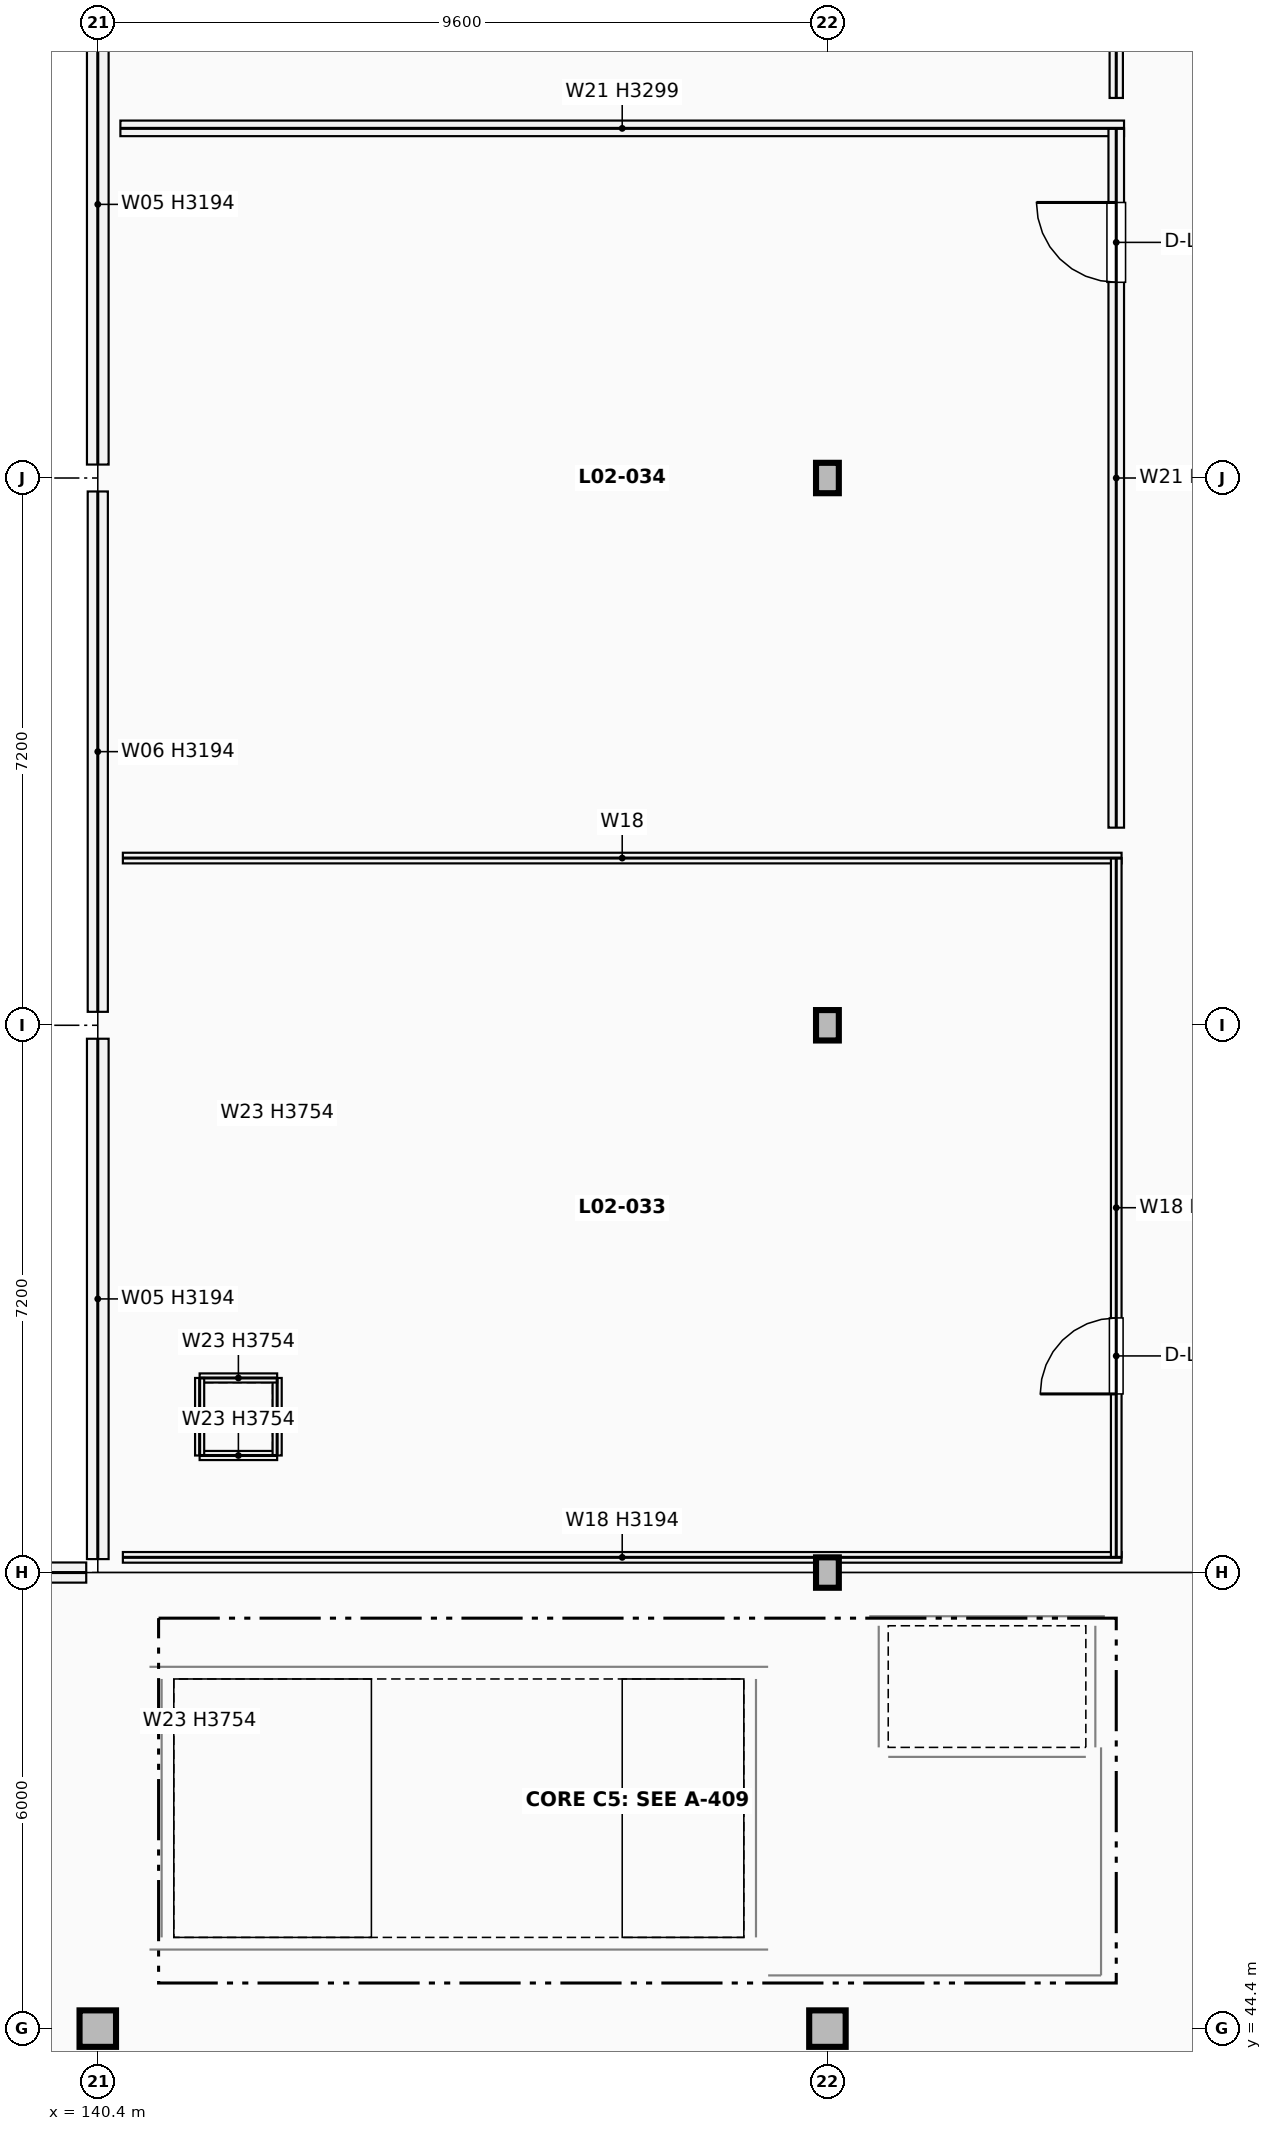
"""IFC4 building model, lengths in metres.
Left out: names, types, materials, properties, quantities, classifications, styles, units other than length and angle.
Written with IfcOpenShell. Run it as: python <this file> out.ifc"""

import sys

from ifc_helpers import new_model, si_unit, direction, frame, frame_2d, origin, origin_2d, place, context, subcontext, project, spatial, rectangle, i_section, extrude, element, fill, save


model = new_model("IFC4")
c1 = context("Model", 3, precision=1e-05, world=origin(), true_north=direction((0.0, 1.0)))
c2 = subcontext(c1, "Body", "Model", "MODEL_VIEW")
j1 = project(units=[si_unit("LENGTHUNIT", "METRE"), si_unit("PLANEANGLEUNIT", "RADIAN")], contexts=[c1])
p1 = place(None, origin())
s1 = spatial("IfcSite", under=j1, at=p1, CompositionType="ELEMENT")
p2 = place(p1, origin())
s2 = spatial("IfcBuilding", under=s1, at=p2, CompositionType="ELEMENT")
p3 = place(p2, frame((0.0, 0.0, 9.52)))
s3 = spatial("IfcBuildingStorey", under=s2, at=p3, CompositionType="ELEMENT", Elevation=9.52)
for number, where, z_axis, x_axis in (
    (1, (140.4, 44.4, 0.0), (0.0, 0.0, 1.0), (1.0, 0.0, 0.0)),
    (2, (150.0, 44.4, 0.0), (0.0, 0.0, 1.0), (1.0, 0.0, 0.0)),
):
    element("IfcColumn", number, at=place(p3, frame(where, z_axis=z_axis, x_axis=x_axis)), inside=s3, PredefinedType="COLUMN", context=c2, shape_type="SweptSolid", body=[
        extrude(rectangle(XDim=0.48, YDim=0.48, at=origin_2d()), origin(), (0.0, 0.0, 1.0), 4.08),
    ])
for number, where, z_axis, x_axis in (
    (3, (150.0, 50.4, 0.0), (0.0, 0.0, 1.0), (1.0, 0.0, 0.0)),
    (4, (150.0, 57.6, 0.0), (0.0, 0.0, 1.0), (1.0, 0.0, 0.0)),
    (5, (150.0, 64.8, 0.0), (0.0, 0.0, 1.0), (1.0, 0.0, 0.0)),
):
    element("IfcColumn", number, at=place(p3, frame(where, z_axis=z_axis, x_axis=x_axis)), inside=s3, PredefinedType="COLUMN", context=c2, shape_type="SweptSolid", body=[
        extrude(i_section(OverallWidth=0.3, OverallDepth=0.4, WebThickness=0.013, FlangeThickness=0.024, at=origin_2d()), origin(), (0.0, 0.0, 1.0), 4.08),
    ])
p4 = place(p3, frame((131.042, 50.4, 0.0), z_axis=(0.0, 0.0, 1.0), x_axis=(1.0, 0.0, 0.0)))
e6 = element("IfcWall", 6, at=p4, inside=s3, PredefinedType="SOLIDWALL", context=c2, shape_type="SweptSolid", body=[
    extrude(rectangle(XDim=9.206, YDim=0.265, at=frame_2d((4.603, 0.0))), origin(), (0.0, 0.0, 1.0), 3.194),
])
p5 = place(p4, frame((1.734, 0.0, 0.75)))
e7 = element("IfcOpeningElement", 7, at=p5, cuts=e6, PredefinedType="OPENING", context=c2, shape_type="SweptSolid", body=[
    extrude(rectangle(XDim=1.05, YDim=2.3, at=frame_2d((0.525, 1.15))), frame((0.0, 0.143, 0.0), z_axis=(0.0, -1.0, 0.0), x_axis=(1.0, 0.0, 0.0)), (0.0, 0.0, 1.0), 0.285),
])
p6 = place(p4, frame((4.078, 0.0, 0.75)))
e8 = element("IfcOpeningElement", 8, at=p6, cuts=e6, PredefinedType="OPENING", context=c2, shape_type="SweptSolid", body=[
    extrude(rectangle(XDim=1.05, YDim=2.3, at=frame_2d((0.525, 1.15))), frame((0.0, 0.143, 0.0), z_axis=(0.0, -1.0, 0.0), x_axis=(1.0, 0.0, 0.0)), (0.0, 0.0, 1.0), 0.285),
])
p7 = place(p4, frame((6.422, 0.0, 0.75)))
e9 = element("IfcOpeningElement", 9, at=p7, cuts=e6, PredefinedType="OPENING", context=c2, shape_type="SweptSolid", body=[
    extrude(rectangle(XDim=1.05, YDim=2.3, at=frame_2d((0.525, 1.15))), frame((0.0, 0.143, 0.0), z_axis=(0.0, -1.0, 0.0), x_axis=(1.0, 0.0, 0.0)), (0.0, 0.0, 1.0), 0.285),
])
p8 = place(p3, frame((140.4, 50.577, 0.0), z_axis=(0.0, 0.0, 1.0), x_axis=(0.0, 1.0, 0.0)))
e10 = element("IfcWall", 10, at=p8, inside=s3, PredefinedType="SOLIDWALL", context=c2, shape_type="SweptSolid", body=[
    extrude(rectangle(XDim=6.846, YDim=0.285, at=frame_2d((3.423, 0.0))), origin(), (0.0, 0.0, 1.0), 3.194),
])
p9 = place(p3, frame((140.4, 57.777, 0.0), z_axis=(0.0, 0.0, 1.0), x_axis=(0.0, 1.0, 0.0)))
e11 = element("IfcWall", 11, at=p9, inside=s3, PredefinedType="SOLIDWALL", context=c2, shape_type="SweptSolid", body=[
    extrude(rectangle(XDim=6.846, YDim=0.265, at=frame_2d((3.423, 0.0))), origin(), (0.0, 0.0, 1.0), 3.194),
])
p10 = place(p3, frame((140.4, 64.977, 0.0), z_axis=(0.0, 0.0, 1.0), x_axis=(0.0, 1.0, 0.0)))
e12 = element("IfcWall", 12, at=p10, inside=s3, PredefinedType="SOLIDWALL", context=c2, shape_type="SweptSolid", body=[
    extrude(rectangle(XDim=6.846, YDim=0.285, at=frame_2d((3.423, 0.0))), origin(), (0.0, 0.0, 1.0), 3.194),
])
for number, where, z_axis, x_axis in (
    (13, (141.74, 51.94, 0.0), (0.0, 0.0, 1.0), (1.0, 0.0, 0.0)),
    (14, (142.76, 51.94, 0.0), (0.0, 0.0, 1.0), (0.0, 1.0, 0.0)),
    (15, (142.76, 52.96, 0.0), (0.0, 0.0, 1.0), (-1.0, 0.0, 0.0)),
    (16, (141.74, 52.96, 0.0), (0.0, 0.0, 1.0), (0.0, -1.0, 0.0)),
):
    element("IfcWall", number, at=place(p3, frame(where, z_axis=z_axis, x_axis=x_axis)), inside=s3, PredefinedType="PARTITIONING", context=c2, shape_type="SweptSolid", body=[
        extrude(rectangle(XDim=1.02, YDim=0.12, at=frame_2d((0.51, 0.0))), origin(), (0.0, 0.0, 1.0), 3.754),
    ])
p11 = place(p3, frame((141.24, 45.6, 0.0), z_axis=(0.0, 0.0, 1.0), x_axis=(0.0, 1.0, 0.0)))
e17 = element("IfcWall", 17, at=p11, inside=s3, PredefinedType="SHEAR", context=c2, shape_type="SweptSolid", body=[
    extrude(rectangle(XDim=3.4, YDim=0.32, at=frame_2d((1.7, 0.0))), origin(), (0.0, 0.0, 1.0), 4.08),
])
for number, where, z_axis, x_axis in (
    (18, (141.08, 45.44, 0.0), (0.0, 0.0, 1.0), (1.0, 0.0, 0.0)),
    (19, (141.08, 49.16, 0.0), (0.0, 0.0, 1.0), (1.0, 0.0, 0.0)),
):
    element("IfcWall", number, at=place(p3, frame(where, z_axis=z_axis, x_axis=x_axis)), inside=s3, PredefinedType="SHEAR", context=c2, shape_type="SweptSolid", body=[
        extrude(rectangle(XDim=8.14, YDim=0.32, at=frame_2d((4.07, 0.0))), origin(), (0.0, 0.0, 1.0), 4.08),
    ])
p12 = place(p3, frame((149.06, 45.6, 0.0), z_axis=(0.0, 0.0, 1.0), x_axis=(0.0, 1.0, 0.0)))
e20 = element("IfcWall", 20, at=p12, inside=s3, PredefinedType="SHEAR", context=c2, shape_type="SweptSolid", body=[
    extrude(rectangle(XDim=3.4, YDim=0.32, at=frame_2d((1.7, 0.0))), origin(), (0.0, 0.0, 1.0), 4.08),
])
p13 = place(p12, frame((0.65, 0.0, 0.0)))
e21 = element("IfcOpeningElement", 21, at=p13, cuts=e20, PredefinedType="OPENING", context=c2, shape_type="SweptSolid", body=[
    extrude(rectangle(XDim=1.2, YDim=2.2, at=frame_2d((0.6, 1.1))), frame((0.0, 0.17, 0.0), z_axis=(0.0, -1.0, 0.0), x_axis=(1.0, 0.0, 0.0)), (0.0, 0.0, 1.0), 0.34),
])
for number, where, z_axis, x_axis in (
    (22, (150.675, 48.1, 0.0), (0.0, 0.0, 1.0), (0.0, 1.0, 0.0)),
    (23, (153.525, 48.1, 0.0), (0.0, 0.0, 1.0), (0.0, 1.0, 0.0)),
):
    element("IfcWall", number, at=place(p3, frame(where, z_axis=z_axis, x_axis=x_axis)), inside=s3, PredefinedType="SHEAR", context=c2, shape_type="SweptSolid", body=[
        extrude(rectangle(XDim=1.6, YDim=0.25, at=frame_2d((0.8, 0.0))), origin(), (0.0, 0.0, 1.0), 4.08),
    ])
p14 = place(p3, frame((150.55, 49.825, 0.0), z_axis=(0.0, 0.0, 1.0), x_axis=(1.0, 0.0, 0.0)))
e24 = element("IfcWall", 24, at=p14, inside=s3, PredefinedType="SHEAR", context=c2, shape_type="SweptSolid", body=[
    extrude(rectangle(XDim=3.1, YDim=0.25, at=frame_2d((1.55, 0.0))), origin(), (0.0, 0.0, 1.0), 4.08),
])
p15 = place(p3, frame((150.8, 47.975, 0.0), z_axis=(0.0, 0.0, 1.0), x_axis=(1.0, 0.0, 0.0)))
e25 = element("IfcWall", 25, at=p15, inside=s3, PredefinedType="SHEAR", context=c2, shape_type="SweptSolid", body=[
    extrude(rectangle(XDim=2.6, YDim=0.25, at=frame_2d((1.3, 0.0))), origin(), (0.0, 0.0, 1.0), 4.08),
])
p16 = place(p15, frame((0.75, 0.0, 0.0)))
e26 = element("IfcOpeningElement", 26, at=p16, cuts=e25, PredefinedType="OPENING", context=c2, shape_type="SweptSolid", body=[
    extrude(rectangle(XDim=1.1, YDim=2.15, at=frame_2d((0.55, 1.075))), frame((0.0, 0.135, 0.0), z_axis=(0.0, -1.0, 0.0), x_axis=(1.0, 0.0, 0.0)), (0.0, 0.0, 1.0), 0.27),
])
p17 = place(p3, frame((153.6, 45.1, 0.0), z_axis=(0.0, 0.0, 1.0), x_axis=(0.0, 1.0, 0.0)))
e27 = element("IfcWall", 27, at=p17, inside=s3, PredefinedType="PARTITIONING", context=c2, shape_type="SweptSolid", body=[
    extrude(rectangle(XDim=3.0, YDim=0.2, at=frame_2d((1.5, 0.0))), origin(), (0.0, 0.0, 1.0), 3.299),
])
p18 = place(p17, frame((0.775, 0.0, 0.0)))
e28 = element("IfcOpeningElement", 28, at=p18, cuts=e27, PredefinedType="OPENING", context=c2, shape_type="SweptSolid", body=[
    extrude(rectangle(XDim=1.45, YDim=2.2, at=frame_2d((0.725, 1.1))), frame((0.0, 0.11, 0.0), z_axis=(0.0, -1.0, 0.0), x_axis=(1.0, 0.0, 0.0)), (0.0, 0.0, 1.0), 0.22),
])
p19 = place(p3, frame((149.22, 45.1, 0.0), z_axis=(0.0, 0.0, 1.0), x_axis=(1.0, 0.0, 0.0)))
e29 = element("IfcWall", 29, at=p19, inside=s3, PredefinedType="PARTITIONING", context=c2, shape_type="SweptSolid", body=[
    extrude(rectangle(XDim=4.38, YDim=0.2, at=frame_2d((2.19, 0.0))), origin(), (0.0, 0.0, 1.0), 3.299),
])
p20 = place(p3, frame((140.73, 50.6, 0.0), z_axis=(0.0, 0.0, 1.0), x_axis=(1.0, 0.0, 0.0)))
e30 = element("IfcWall", 30, at=p20, inside=s3, PredefinedType="PARTITIONING", context=c2, shape_type="SweptSolid", body=[
    extrude(rectangle(XDim=13.14, YDim=0.14, at=frame_2d((6.57, 0.0))), origin(), (0.0, 0.0, 1.0), 3.194),
])
p21 = place(p3, frame((140.73, 59.8, 0.0), z_axis=(0.0, 0.0, 1.0), x_axis=(1.0, 0.0, 0.0)))
e31 = element("IfcWall", 31, at=p21, inside=s3, PredefinedType="PARTITIONING", context=c2, shape_type="SweptSolid", body=[
    extrude(rectangle(XDim=13.14, YDim=0.14, at=frame_2d((6.57, 0.0))), origin(), (0.0, 0.0, 1.0), 3.299),
])
p22 = place(p3, frame((153.8, 50.6, 0.0), z_axis=(0.0, 0.0, 1.0), x_axis=(0.0, 1.0, 0.0)))
e32 = element("IfcWall", 32, at=p22, inside=s3, PredefinedType="PARTITIONING", context=c2, shape_type="SweptSolid", body=[
    extrude(rectangle(XDim=9.2, YDim=0.14, at=frame_2d((4.6, 0.0))), origin(), (0.0, 0.0, 1.0), 3.194),
])
p23 = place(p22, frame((2.15, 0.0, 0.0)))
e33 = element("IfcOpeningElement", 33, at=p23, cuts=e32, PredefinedType="OPENING", context=c2, shape_type="SweptSolid", body=[
    extrude(rectangle(XDim=1.0, YDim=2.1, at=frame_2d((0.5, 1.05))), frame((0.0, 0.08, 0.0), z_axis=(0.0, -1.0, 0.0), x_axis=(1.0, 0.0, 0.0)), (0.0, 0.0, 1.0), 0.16),
])
p24 = place(p3, frame((140.698, 69.4, 0.0), z_axis=(0.0, 0.0, 1.0), x_axis=(1.0, 0.0, 0.0)))
e34 = element("IfcWall", 34, at=p24, inside=s3, PredefinedType="PARTITIONING", context=c2, shape_type="SweptSolid", body=[
    extrude(rectangle(XDim=13.205, YDim=0.205, at=frame_2d((6.603, 0.0))), origin(), (0.0, 0.0, 1.0), 3.299),
])
p25 = place(p3, frame((153.8, 60.2, 0.0), z_axis=(0.0, 0.0, 1.0), x_axis=(0.0, 1.0, 0.0)))
e35 = element("IfcWall", 35, at=p25, inside=s3, PredefinedType="PARTITIONING", context=c2, shape_type="SweptSolid", body=[
    extrude(rectangle(XDim=9.2, YDim=0.205, at=frame_2d((4.6, 0.0))), origin(), (0.0, 0.0, 1.0), 3.194),
])
p26 = place(p25, frame((7.175, 0.0, 0.0)))
e36 = element("IfcOpeningElement", 36, at=p26, cuts=e35, PredefinedType="OPENING", context=c2, shape_type="SweptSolid", body=[
    extrude(rectangle(XDim=1.05, YDim=2.15, at=frame_2d((0.525, 1.075))), frame((0.0, 0.113, 0.0), z_axis=(0.0, -1.0, 0.0), x_axis=(1.0, 0.0, 0.0)), (0.0, 0.0, 1.0), 0.225),
])
p27 = place(p3, frame((153.8, 69.8, 0.0), z_axis=(0.0, 0.0, 1.0), x_axis=(0.0, 1.0, 0.0)))
e37 = element("IfcWall", 37, at=p27, inside=s3, PredefinedType="PARTITIONING", context=c2, shape_type="SweptSolid", body=[
    extrude(rectangle(XDim=9.2, YDim=0.175, at=frame_2d((4.6, 0.0))), origin(), (0.0, 0.0, 1.0), 3.194),
])
p28 = place(p27, frame((5.99, 0.0, 0.0)))
e38 = element("IfcOpeningElement", 38, at=p28, cuts=e37, PredefinedType="OPENING", context=c2, shape_type="SweptSolid", body=[
    extrude(rectangle(XDim=1.08, YDim=2.16, at=frame_2d((0.54, 1.08))), frame((0.0, 0.098, 0.0), z_axis=(0.0, -1.0, 0.0), x_axis=(1.0, 0.0, 0.0)), (0.0, 0.0, 1.0), 0.195),
])
p29 = place(p13, origin())
e39 = element("IfcDoor", 39, at=p29, inside=s3, OperationType="SINGLE_SWING_RIGHT", PredefinedType="DOOR", context=c2, shape_type="SweptSolid", body=[
    extrude(rectangle(XDim=1.2, YDim=2.2, at=frame_2d((0.6, 1.1))), frame((0.0, 0.025, 0.0), z_axis=(0.0, -1.0, 0.0), x_axis=(1.0, 0.0, 0.0)), (0.0, 0.0, 1.0), 0.05),
])
fill(e21, e39)
p30 = place(p16, origin())
e40 = element("IfcDoor", 40, at=p30, inside=s3, OperationType="DOUBLE_DOOR_SLIDING", PredefinedType="DOOR", context=c2, shape_type="SweptSolid", body=[
    extrude(rectangle(XDim=1.1, YDim=2.15, at=frame_2d((0.55, 1.075))), frame((0.0, 0.025, 0.0), z_axis=(0.0, -1.0, 0.0), x_axis=(1.0, 0.0, 0.0)), (0.0, 0.0, 1.0), 0.05),
])
fill(e26, e40)
p31 = place(p18, frame((1.45, 0.0, 0.0), z_axis=(0.0, 0.0, 1.0), x_axis=(-1.0, 0.0, 0.0)))
e41 = element("IfcDoor", 41, at=p31, inside=s3, OperationType="DOUBLE_DOOR_SINGLE_SWING", PredefinedType="DOOR", context=c2, shape_type="SweptSolid", body=[
    extrude(rectangle(XDim=1.45, YDim=2.2, at=frame_2d((0.725, 1.1))), frame((0.0, 0.025, 0.0), z_axis=(0.0, -1.0, 0.0), x_axis=(1.0, 0.0, 0.0)), (0.0, 0.0, 1.0), 0.05),
])
fill(e28, e41)
p32 = place(p23, origin())
e42 = element("IfcDoor", 42, at=p32, inside=s3, OperationType="SINGLE_SWING_LEFT", PredefinedType="DOOR", context=c2, shape_type="SweptSolid", body=[
    extrude(rectangle(XDim=1.0, YDim=2.1, at=frame_2d((0.5, 1.05))), frame((0.0, 0.025, 0.0), z_axis=(0.0, -1.0, 0.0), x_axis=(1.0, 0.0, 0.0)), (0.0, 0.0, 1.0), 0.05),
])
fill(e33, e42)
p33 = place(p26, origin())
e43 = element("IfcDoor", 43, at=p33, inside=s3, OperationType="SINGLE_SWING_RIGHT", PredefinedType="DOOR", context=c2, shape_type="SweptSolid", body=[
    extrude(rectangle(XDim=1.05, YDim=2.15, at=frame_2d((0.525, 1.075))), frame((0.0, 0.025, 0.0), z_axis=(0.0, -1.0, 0.0), x_axis=(1.0, 0.0, 0.0)), (0.0, 0.0, 1.0), 0.05),
])
fill(e36, e43)
save(model, sys.argv[1])
